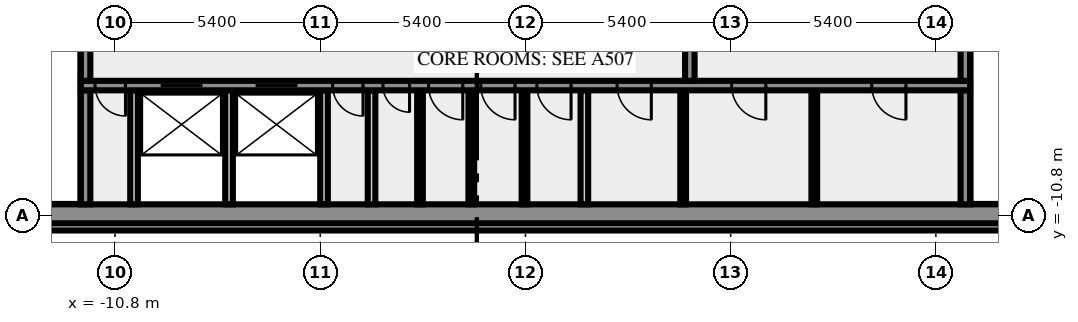
"""IFC4 building model, lengths in metres.
Left out: names, types, materials, properties, quantities, classifications, styles, units other than length and angle.
Written with IfcOpenShell. Run it as: python <this file> out.ifc"""

import sys

from ifc_helpers import new_model, si_unit, direction, frame, frame_2d, origin, place, context, subcontext, project, spatial, rectangle, extrude, element, fill, save


model = new_model("IFC4")
c1 = context("Model", 3, precision=1e-05, world=origin(), true_north=direction((0.0, 1.0)))
c2 = subcontext(c1, "Body", "Model", "MODEL_VIEW")
j1 = project(units=[si_unit("LENGTHUNIT", "METRE"), si_unit("PLANEANGLEUNIT", "RADIAN")], contexts=[c1])
p1 = place(None, origin())
s1 = spatial("IfcSite", under=j1, at=p1, CompositionType="ELEMENT")
p2 = place(p1, origin())
s2 = spatial("IfcBuilding", under=s1, at=p2, CompositionType="ELEMENT")
p3 = place(p2, frame((0.0, 0.0, 261.0)))
s3 = spatial("IfcBuildingStorey", under=s2, at=p3, CompositionType="ELEMENT", Elevation=261.0)
p4 = place(p3, frame((-17.444, -11.088, 0.0), z_axis=(0.0, 0.0, 1.0), x_axis=(1.0, 0.0, 0.0)))
e1 = element("IfcWall", 1, at=p4, inside=s3, PredefinedType="SOLIDWALL", context=c2, shape_type="SweptSolid", body=[
    extrude(rectangle(XDim=34.888, YDim=0.2, at=frame_2d((17.444, 0.0))), origin(), (0.0, 0.0, 1.0), 3.65),
])
p5 = place(p3, frame((-20.0, -10.75, 0.0), z_axis=(0.0, 0.0, 1.0), x_axis=(1.0, 0.0, 0.0)))
e2 = element("IfcWall", 2, at=p5, inside=s3, PredefinedType="SHEAR", context=c2, shape_type="SweptSolid", body=[
    extrude(rectangle(XDim=40.0, YDim=0.5, at=frame_2d((20.0, 0.0))), origin(), (0.0, 0.0, 1.0), 3.65),
])
p6 = place(p5, frame((0.8, 0.0, 1.0)))
e3 = element("IfcOpeningElement", 3, at=p6, cuts=e2, PredefinedType="OPENING", context=c2, shape_type="SweptSolid", body=[
    extrude(rectangle(XDim=1.2, YDim=1.2, at=frame_2d((0.6, 0.6))), frame((0.0, 0.26, 0.0), z_axis=(0.0, -1.0, 0.0), x_axis=(1.0, 0.0, 0.0)), (0.0, 0.0, 1.0), 0.52),
])
p7 = place(p5, frame((38.0, 0.0, 1.0)))
e4 = element("IfcOpeningElement", 4, at=p7, cuts=e2, PredefinedType="OPENING", context=c2, shape_type="SweptSolid", body=[
    extrude(rectangle(XDim=1.2, YDim=1.2, at=frame_2d((0.6, 0.6))), frame((0.0, 0.26, 0.0), z_axis=(0.0, -1.0, 0.0), x_axis=(1.0, 0.0, 0.0)), (0.0, 0.0, 1.0), 0.52),
])
p8 = place(p3, frame((-11.575, -10.5, 0.0), z_axis=(0.0, 0.0, 1.0), x_axis=(0.0, 1.0, 0.0)))
e5 = element("IfcWall", 5, at=p8, inside=s3, PredefinedType="SHEAR", context=c2, shape_type="SweptSolid", body=[
    extrude(rectangle(XDim=3.0, YDim=0.25, at=frame_2d((1.5, 0.0))), origin(), (0.0, 0.0, 1.0), 3.65),
])
for number, where, z_axis, x_axis in (
    (6, (-10.3, -10.5, 0.0), (0.0, 0.0, 1.0), (0.0, 1.0, 0.0)),
    (7, (-7.8, -10.5, 0.0), (0.0, 0.0, 1.0), (0.0, 1.0, 0.0)),
    (8, (-5.3, -10.5, 0.0), (0.0, 0.0, 1.0), (0.0, 1.0, 0.0)),
    (9, (-4.05, -10.5, 0.0), (0.0, 0.0, 1.0), (0.0, 1.0, 0.0)),
):
    element("IfcWall", number, at=place(p3, frame(where, z_axis=z_axis, x_axis=x_axis)), inside=s3, PredefinedType="SOLIDWALL", context=c2, shape_type="SweptSolid", body=[
        extrude(rectangle(XDim=3.0, YDim=0.2, at=frame_2d((1.5, 0.0))), origin(), (0.0, 0.0, 1.0), 3.65),
    ])
for number, where, z_axis, x_axis in (
    (10, (-2.775, -10.5, 0.0), (0.0, 0.0, 1.0), (0.0, 1.0, 0.0)),
    (11, (-1.425, -10.5, 0.0), (0.0, 0.0, 1.0), (0.0, 1.0, 0.0)),
    (12, (-0.025, -10.5, 0.0), (0.0, 0.0, 1.0), (0.0, 1.0, 0.0)),
):
    element("IfcWall", number, at=place(p3, frame(where, z_axis=z_axis, x_axis=x_axis)), inside=s3, PredefinedType="PARTITIONING", context=c2, shape_type="SweptSolid", body=[
        extrude(rectangle(XDim=3.0, YDim=0.15, at=frame_2d((1.5, 0.0))), origin(), (0.0, 0.0, 1.0), 3.65),
    ])
p9 = place(p3, frame((1.55, -10.5, 0.0), z_axis=(0.0, 0.0, 1.0), x_axis=(0.0, 1.0, 0.0)))
e13 = element("IfcWall", 13, at=p9, inside=s3, PredefinedType="SOLIDWALL", context=c2, shape_type="SweptSolid", body=[
    extrude(rectangle(XDim=3.0, YDim=0.2, at=frame_2d((1.5, 0.0))), origin(), (0.0, 0.0, 1.0), 3.65),
])
for number, where, z_axis, x_axis in (
    (14, (4.15, -10.5, 0.0), (0.0, 0.0, 1.0), (0.0, 1.0, 0.0)),
    (15, (7.6, -10.5, 0.0), (0.0, 0.0, 1.0), (0.0, 1.0, 0.0)),
):
    element("IfcWall", number, at=place(p3, frame(where, z_axis=z_axis, x_axis=x_axis)), inside=s3, PredefinedType="PARTITIONING", context=c2, shape_type="SweptSolid", body=[
        extrude(rectangle(XDim=3.0, YDim=0.15, at=frame_2d((1.5, 0.0))), origin(), (0.0, 0.0, 1.0), 3.65),
    ])
p10 = place(p3, frame((11.575, -10.5, 0.0), z_axis=(0.0, 0.0, 1.0), x_axis=(0.0, 1.0, 0.0)))
e16 = element("IfcWall", 16, at=p10, inside=s3, PredefinedType="SHEAR", context=c2, shape_type="SweptSolid", body=[
    extrude(rectangle(XDim=3.0, YDim=0.25, at=frame_2d((1.5, 0.0))), origin(), (0.0, 0.0, 1.0), 3.65),
])
p11 = place(p3, frame((11.7, -7.375, 0.0), z_axis=(0.0, 0.0, 1.0), x_axis=(-1.0, 0.0, 0.0)))
e17 = element("IfcWall", 17, at=p11, inside=s3, PredefinedType="SHEAR", context=c2, shape_type="SweptSolid", body=[
    extrude(rectangle(XDim=23.4, YDim=0.25, at=frame_2d((11.7, 0.0))), origin(), (0.0, 0.0, 1.0), 3.65),
])
p12 = place(p11, frame((22.225, 0.0, 0.0)))
e18 = element("IfcOpeningElement", 18, at=p12, cuts=e17, PredefinedType="OPENING", context=c2, shape_type="SweptSolid", body=[
    extrude(rectangle(XDim=0.8, YDim=2.1, at=frame_2d((0.4, 1.05))), frame((0.0, 0.135, 0.0), z_axis=(0.0, -1.0, 0.0), x_axis=(1.0, 0.0, 0.0)), (0.0, 0.0, 1.0), 0.27),
])
p13 = place(p11, frame((20.2, 0.0, 0.0)))
e19 = element("IfcOpeningElement", 19, at=p13, cuts=e17, PredefinedType="OPENING", context=c2, shape_type="SweptSolid", body=[
    extrude(rectangle(XDim=1.1, YDim=2.1, at=frame_2d((0.55, 1.05))), frame((0.0, 0.135, 0.0), z_axis=(0.0, -1.0, 0.0), x_axis=(1.0, 0.0, 0.0)), (0.0, 0.0, 1.0), 0.27),
])
p14 = place(p11, frame((17.7, 0.0, 0.0)))
e20 = element("IfcOpeningElement", 20, at=p14, cuts=e17, PredefinedType="OPENING", context=c2, shape_type="SweptSolid", body=[
    extrude(rectangle(XDim=1.1, YDim=2.1, at=frame_2d((0.55, 1.05))), frame((0.0, 0.135, 0.0), z_axis=(0.0, -1.0, 0.0), x_axis=(1.0, 0.0, 0.0)), (0.0, 0.0, 1.0), 0.27),
])
p15 = place(p11, frame((15.975, 0.0, 0.0)))
e21 = element("IfcOpeningElement", 21, at=p15, cuts=e17, PredefinedType="OPENING", context=c2, shape_type="SweptSolid", body=[
    extrude(rectangle(XDim=0.8, YDim=2.1, at=frame_2d((0.4, 1.05))), frame((0.0, 0.135, 0.0), z_axis=(0.0, -1.0, 0.0), x_axis=(1.0, 0.0, 0.0)), (0.0, 0.0, 1.0), 0.27),
])
p16 = place(p11, frame((14.75, 0.0, 0.0)))
e22 = element("IfcOpeningElement", 22, at=p16, cuts=e17, PredefinedType="OPENING", context=c2, shape_type="SweptSolid", body=[
    extrude(rectangle(XDim=0.7, YDim=2.1, at=frame_2d((0.35, 1.05))), frame((0.0, 0.135, 0.0), z_axis=(0.0, -1.0, 0.0), x_axis=(1.0, 0.0, 0.0)), (0.0, 0.0, 1.0), 0.27),
])
p17 = place(p11, frame((13.35, 0.0, 0.0)))
e23 = element("IfcOpeningElement", 23, at=p17, cuts=e17, PredefinedType="OPENING", context=c2, shape_type="SweptSolid", body=[
    extrude(rectangle(XDim=0.9, YDim=2.1, at=frame_2d((0.45, 1.05))), frame((0.0, 0.135, 0.0), z_axis=(0.0, -1.0, 0.0), x_axis=(1.0, 0.0, 0.0)), (0.0, 0.0, 1.0), 0.27),
])
p18 = place(p11, frame((11.975, 0.0, 0.0)))
e24 = element("IfcOpeningElement", 24, at=p18, cuts=e17, PredefinedType="OPENING", context=c2, shape_type="SweptSolid", body=[
    extrude(rectangle(XDim=0.9, YDim=2.1, at=frame_2d((0.45, 1.05))), frame((0.0, 0.135, 0.0), z_axis=(0.0, -1.0, 0.0), x_axis=(1.0, 0.0, 0.0)), (0.0, 0.0, 1.0), 0.27),
])
p19 = place(p11, frame((10.5, 0.0, 0.0)))
e25 = element("IfcOpeningElement", 25, at=p19, cuts=e17, PredefinedType="OPENING", context=c2, shape_type="SweptSolid", body=[
    extrude(rectangle(XDim=0.9, YDim=2.1, at=frame_2d((0.45, 1.05))), frame((0.0, 0.135, 0.0), z_axis=(0.0, -1.0, 0.0), x_axis=(1.0, 0.0, 0.0)), (0.0, 0.0, 1.0), 0.27),
])
p20 = place(p11, frame((8.388, 0.0, 0.0)))
e26 = element("IfcOpeningElement", 26, at=p20, cuts=e17, PredefinedType="OPENING", context=c2, shape_type="SweptSolid", body=[
    extrude(rectangle(XDim=0.9, YDim=2.1, at=frame_2d((0.45, 1.05))), frame((0.0, 0.135, 0.0), z_axis=(0.0, -1.0, 0.0), x_axis=(1.0, 0.0, 0.0)), (0.0, 0.0, 1.0), 0.27),
])
p21 = place(p11, frame((5.375, 0.0, 0.0)))
e27 = element("IfcOpeningElement", 27, at=p21, cuts=e17, PredefinedType="OPENING", context=c2, shape_type="SweptSolid", body=[
    extrude(rectangle(XDim=0.9, YDim=2.1, at=frame_2d((0.45, 1.05))), frame((0.0, 0.135, 0.0), z_axis=(0.0, -1.0, 0.0), x_axis=(1.0, 0.0, 0.0)), (0.0, 0.0, 1.0), 0.27),
])
p22 = place(p11, frame((1.688, 0.0, 0.0)))
e28 = element("IfcOpeningElement", 28, at=p22, cuts=e17, PredefinedType="OPENING", context=c2, shape_type="SweptSolid", body=[
    extrude(rectangle(XDim=0.9, YDim=2.1, at=frame_2d((0.45, 1.05))), frame((0.0, 0.135, 0.0), z_axis=(0.0, -1.0, 0.0), x_axis=(1.0, 0.0, 0.0)), (0.0, 0.0, 1.0), 0.27),
])
p23 = place(p3, frame((-11.575, -7.25, 0.0), z_axis=(0.0, 0.0, 1.0), x_axis=(0.0, 1.0, 0.0)))
e29 = element("IfcWall", 29, at=p23, inside=s3, PredefinedType="SHEAR", context=c2, shape_type="SweptSolid", body=[
    extrude(rectangle(XDim=1.0, YDim=0.25, at=frame_2d((0.5, 0.0))), origin(), (0.0, 0.0, 1.0), 3.65),
])
p24 = place(p3, frame((4.325, -7.25, 0.0), z_axis=(0.0, 0.0, 1.0), x_axis=(0.0, 1.0, 0.0)))
e30 = element("IfcWall", 30, at=p24, inside=s3, PredefinedType="SHEAR", context=c2, shape_type="SweptSolid", body=[
    extrude(rectangle(XDim=3.0, YDim=0.25, at=frame_2d((1.5, 0.0))), origin(), (0.0, 0.0, 1.0), 3.65),
])
p25 = place(p24, frame((0.8, 0.0, 0.0)))
e31 = element("IfcOpeningElement", 31, at=p25, cuts=e30, PredefinedType="OPENING", context=c2, shape_type="SweptSolid", body=[
    extrude(rectangle(XDim=1.4, YDim=2.1, at=frame_2d((0.7, 1.05))), frame((0.0, 0.135, 0.0), z_axis=(0.0, -1.0, 0.0), x_axis=(1.0, 0.0, 0.0)), (0.0, 0.0, 1.0), 0.27),
])
p26 = place(p3, frame((11.575, -7.25, 0.0), z_axis=(0.0, 0.0, 1.0), x_axis=(0.0, 1.0, 0.0)))
e32 = element("IfcWall", 32, at=p26, inside=s3, PredefinedType="SHEAR", context=c2, shape_type="SweptSolid", body=[
    extrude(rectangle(XDim=1.0, YDim=0.25, at=frame_2d((0.5, 0.0))), origin(), (0.0, 0.0, 1.0), 3.65),
])
p27 = place(p12, origin())
e33 = element("IfcDoor", 33, at=p27, inside=s3, OperationType="SINGLE_SWING_RIGHT", PredefinedType="DOOR", context=c2, shape_type="SweptSolid", body=[
    extrude(rectangle(XDim=0.8, YDim=2.1, at=frame_2d((0.4, 1.05))), frame((0.0, 0.025, 0.0), z_axis=(0.0, -1.0, 0.0), x_axis=(1.0, 0.0, 0.0)), (0.0, 0.0, 1.0), 0.05),
])
fill(e18, e33)
p28 = place(p13, origin())
e34 = element("IfcDoor", 34, at=p28, inside=s3, OperationType="DOUBLE_DOOR_SLIDING", PredefinedType="DOOR", context=c2, shape_type="SweptSolid", body=[
    extrude(rectangle(XDim=1.1, YDim=2.1, at=frame_2d((0.55, 1.05))), frame((0.0, 0.025, 0.0), z_axis=(0.0, -1.0, 0.0), x_axis=(1.0, 0.0, 0.0)), (0.0, 0.0, 1.0), 0.05),
])
fill(e19, e34)
p29 = place(p14, origin())
e35 = element("IfcDoor", 35, at=p29, inside=s3, OperationType="DOUBLE_DOOR_SLIDING", PredefinedType="DOOR", context=c2, shape_type="SweptSolid", body=[
    extrude(rectangle(XDim=1.1, YDim=2.1, at=frame_2d((0.55, 1.05))), frame((0.0, 0.025, 0.0), z_axis=(0.0, -1.0, 0.0), x_axis=(1.0, 0.0, 0.0)), (0.0, 0.0, 1.0), 0.05),
])
fill(e20, e35)
p30 = place(p15, origin())
e36 = element("IfcDoor", 36, at=p30, inside=s3, OperationType="SINGLE_SWING_RIGHT", PredefinedType="DOOR", context=c2, shape_type="SweptSolid", body=[
    extrude(rectangle(XDim=0.8, YDim=2.1, at=frame_2d((0.4, 1.05))), frame((0.0, 0.025, 0.0), z_axis=(0.0, -1.0, 0.0), x_axis=(1.0, 0.0, 0.0)), (0.0, 0.0, 1.0), 0.05),
])
fill(e21, e36)
p31 = place(p16, origin())
e37 = element("IfcDoor", 37, at=p31, inside=s3, OperationType="SINGLE_SWING_RIGHT", PredefinedType="DOOR", context=c2, shape_type="SweptSolid", body=[
    extrude(rectangle(XDim=0.7, YDim=2.1, at=frame_2d((0.35, 1.05))), frame((0.0, 0.025, 0.0), z_axis=(0.0, -1.0, 0.0), x_axis=(1.0, 0.0, 0.0)), (0.0, 0.0, 1.0), 0.05),
])
fill(e22, e37)
p32 = place(p17, origin())
e38 = element("IfcDoor", 38, at=p32, inside=s3, OperationType="SINGLE_SWING_RIGHT", PredefinedType="DOOR", context=c2, shape_type="SweptSolid", body=[
    extrude(rectangle(XDim=0.9, YDim=2.1, at=frame_2d((0.45, 1.05))), frame((0.0, 0.025, 0.0), z_axis=(0.0, -1.0, 0.0), x_axis=(1.0, 0.0, 0.0)), (0.0, 0.0, 1.0), 0.05),
])
fill(e23, e38)
p33 = place(p18, origin())
e39 = element("IfcDoor", 39, at=p33, inside=s3, OperationType="SINGLE_SWING_RIGHT", PredefinedType="DOOR", context=c2, shape_type="SweptSolid", body=[
    extrude(rectangle(XDim=0.9, YDim=2.1, at=frame_2d((0.45, 1.05))), frame((0.0, 0.025, 0.0), z_axis=(0.0, -1.0, 0.0), x_axis=(1.0, 0.0, 0.0)), (0.0, 0.0, 1.0), 0.05),
])
fill(e24, e39)
p34 = place(p19, origin())
e40 = element("IfcDoor", 40, at=p34, inside=s3, OperationType="SINGLE_SWING_LEFT", PredefinedType="DOOR", context=c2, shape_type="SweptSolid", body=[
    extrude(rectangle(XDim=0.9, YDim=2.1, at=frame_2d((0.45, 1.05))), frame((0.0, 0.025, 0.0), z_axis=(0.0, -1.0, 0.0), x_axis=(1.0, 0.0, 0.0)), (0.0, 0.0, 1.0), 0.05),
])
fill(e25, e40)
p35 = place(p20, origin())
e41 = element("IfcDoor", 41, at=p35, inside=s3, OperationType="SINGLE_SWING_LEFT", PredefinedType="DOOR", context=c2, shape_type="SweptSolid", body=[
    extrude(rectangle(XDim=0.9, YDim=2.1, at=frame_2d((0.45, 1.05))), frame((0.0, 0.025, 0.0), z_axis=(0.0, -1.0, 0.0), x_axis=(1.0, 0.0, 0.0)), (0.0, 0.0, 1.0), 0.05),
])
fill(e26, e41)
p36 = place(p21, origin())
e42 = element("IfcDoor", 42, at=p36, inside=s3, OperationType="SINGLE_SWING_LEFT", PredefinedType="DOOR", context=c2, shape_type="SweptSolid", body=[
    extrude(rectangle(XDim=0.9, YDim=2.1, at=frame_2d((0.45, 1.05))), frame((0.0, 0.025, 0.0), z_axis=(0.0, -1.0, 0.0), x_axis=(1.0, 0.0, 0.0)), (0.0, 0.0, 1.0), 0.05),
])
fill(e27, e42)
p37 = place(p22, origin())
e43 = element("IfcDoor", 43, at=p37, inside=s3, OperationType="SINGLE_SWING_LEFT", PredefinedType="DOOR", context=c2, shape_type="SweptSolid", body=[
    extrude(rectangle(XDim=0.9, YDim=2.1, at=frame_2d((0.45, 1.05))), frame((0.0, 0.025, 0.0), z_axis=(0.0, -1.0, 0.0), x_axis=(1.0, 0.0, 0.0)), (0.0, 0.0, 1.0), 0.05),
])
fill(e28, e43)
save(model, sys.argv[1])
